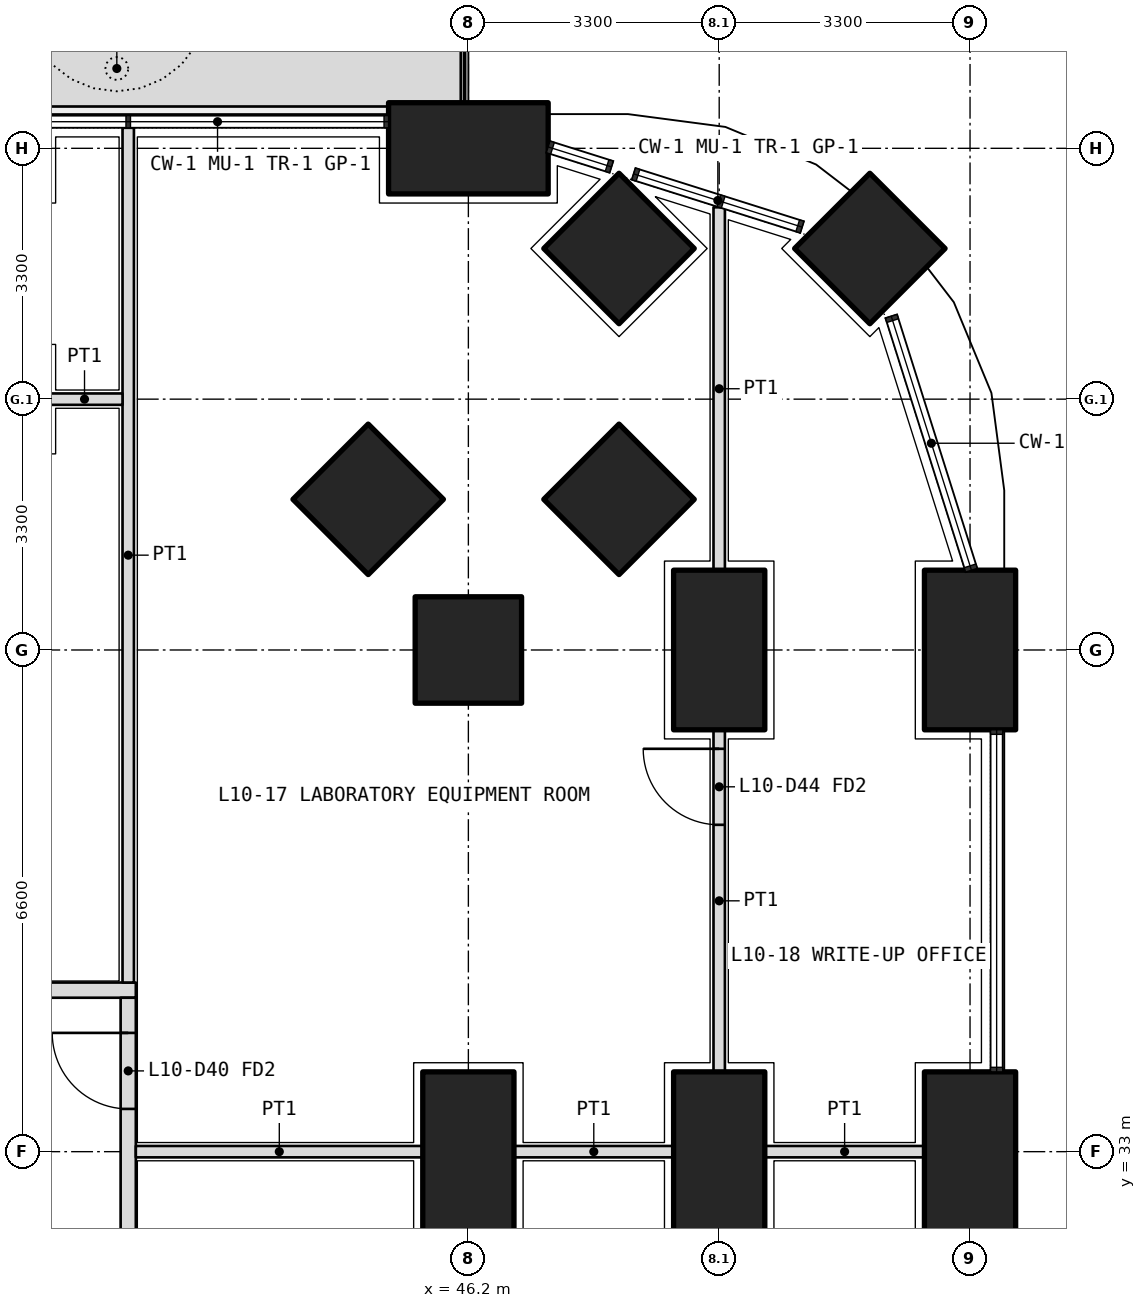
"""IFC4 building model, lengths in metres.
Left out: names, types, materials, properties, quantities, classifications, styles, units other than length and angle.
Written with IfcOpenShell. Run it as: python <this file> out.ifc"""

import sys

from ifc_helpers import new_model, si_unit, direction, frame, frame_2d, origin, origin_2d, place, context, subcontext, project, spatial, polyline, rectangle, outline, extrude, element, fill, save


model = new_model("IFC4")
c1 = context("Model", 3, precision=1e-05, world=origin(), true_north=direction((0.0, 1.0)))
c2 = subcontext(c1, "Body", "Model", "MODEL_VIEW")
j1 = project(units=[si_unit("LENGTHUNIT", "METRE"), si_unit("PLANEANGLEUNIT", "RADIAN")], contexts=[c1])
p1 = place(None, origin())
s1 = spatial("IfcSite", under=j1, at=p1, CompositionType="ELEMENT")
p2 = place(p1, origin())
s2 = spatial("IfcBuilding", under=s1, at=p2, CompositionType="ELEMENT")
p3 = place(p2, frame((0.0, 0.0, 46.5)))
s3 = spatial("IfcBuildingStorey", under=s2, at=p3, CompositionType="ELEMENT", Elevation=46.5)
p4 = place(p3, frame((51.482, 44.882, 0.0), z_axis=(0.0, 0.0, 1.0), x_axis=(0.707106781187, 0.707106781187, 0.0)))
e1 = element("IfcColumn", 1, at=p4, inside=s3, PredefinedType="COLUMN", context=c2, shape_type="SweptSolid", body=[
    extrude(rectangle(XDim=1.4, YDim=1.4, at=origin_2d()), origin(), (0.0, 0.0, 1.0), 4.2),
])
for number, where, z_axis, x_axis in (
    (2, (52.8, 33.0, 0.0), (0.0, 0.0, 1.0), (0.0, 1.0, 0.0)),
    (3, (52.8, 39.6, 0.0), (0.0, 0.0, 1.0), (0.0, 1.0, 0.0)),
    (4, (46.2, 46.2, 0.0), (0.0, 0.0, 1.0), (1.0, 0.0, 0.0)),
):
    element("IfcColumn", number, at=place(p3, frame(where, z_axis=z_axis, x_axis=x_axis)), inside=s3, PredefinedType="COLUMN", context=c2, shape_type="SweptSolid", body=[
        extrude(rectangle(XDim=2.1, YDim=1.2, at=origin_2d()), origin(), (0.0, 0.0, 1.0), 4.2),
    ])
for number, where, z_axis, x_axis in (
    (5, (46.2, 39.6, 0.0), (0.0, 0.0, 1.0), (1.0, 0.0, 0.0)),
    (6, (48.182, 44.882, 0.0), (0.0, 0.0, 1.0), (0.707, 0.707, 0.0)),
):
    element("IfcColumn", number, at=place(p3, frame(where, z_axis=z_axis, x_axis=x_axis)), inside=s3, PredefinedType="COLUMN", context=c2, shape_type="SweptSolid", body=[
        extrude(rectangle(XDim=1.4, YDim=1.4, at=origin_2d()), origin(), (0.0, 0.0, 1.0), 4.2),
    ])
for number, where, z_axis, x_axis in (
    (7, (49.5, 33.0, 0.0), (0.0, 0.0, 1.0), (0.0, 1.0, 0.0)),
    (8, (49.5, 39.6, 0.0), (0.0, 0.0, 1.0), (0.0, 1.0, 0.0)),
):
    element("IfcColumn", number, at=place(p3, frame(where, z_axis=z_axis, x_axis=x_axis)), inside=s3, PredefinedType="COLUMN", context=c2, shape_type="SweptSolid", body=[
        extrude(rectangle(XDim=2.1, YDim=1.2, at=origin_2d()), origin(), (0.0, 0.0, 1.0), 4.2),
    ])
for number, where, z_axis, x_axis in (
    (9, (48.182, 41.582, 0.0), (0.0, 0.0, 1.0), (0.707, 0.707, 0.0)),
    (10, (44.882, 41.582, 0.0), (0.0, 0.0, 1.0), (0.707, 0.707, 0.0)),
):
    element("IfcColumn", number, at=place(p3, frame(where, z_axis=z_axis, x_axis=x_axis)), inside=s3, PredefinedType="COLUMN", context=c2, shape_type="SweptSolid", body=[
        extrude(rectangle(XDim=1.4, YDim=1.4, at=origin_2d()), origin(), (0.0, 0.0, 1.0), 4.2),
    ])
p5 = place(p3, frame((46.2, 33.0, 0.0), z_axis=(0.0, 0.0, 1.0), x_axis=(0.0, 1.0, 0.0)))
e11 = element("IfcColumn", 11, at=p5, inside=s3, PredefinedType="COLUMN", context=c2, shape_type="SweptSolid", body=[
    extrude(rectangle(XDim=2.1, YDim=1.2, at=origin_2d()), origin(), (0.0, 0.0, 1.0), 4.2),
])
p6 = place(p3, origin())
e12 = element("IfcWall", 12, at=p6, inside=s3, PredefinedType="USERDEFINED", context=c2, shape_type="SweptSolid", body=[
    extrude(outline(polyline([(37.05, 46.75), (46.1, 46.75), (46.1, 47.75), (37.05, 47.75), (37.05, 46.75)]), holes=[polyline([(37.2, 46.9), (45.95, 46.9), (45.95, 47.6), (37.2, 47.6), (37.2, 46.9)])]), origin(), (0.0, 0.0, 1.0), 1.05),
])
p7 = place(p3, frame((10.975, 35.125, 0.0), z_axis=(0.0, 0.0, 1.0), x_axis=(1.0, 0.0, 0.0)))
e13 = element("IfcWall", 13, at=p7, inside=s3, PredefinedType="PARTITIONING", context=c2, shape_type="SweptSolid", body=[
    extrude(rectangle(XDim=30.85, YDim=0.2, at=frame_2d((15.425, 0.0))), origin(), (0.0, 0.0, 1.0), 2.85),
])
p8 = place(p7, frame((3.962, 0.0, 0.0)))
e14 = element("IfcOpeningElement", 14, at=p8, cuts=e13, PredefinedType="OPENING", context=c2, shape_type="SweptSolid", body=[
    extrude(rectangle(XDim=1.0, YDim=2.1, at=frame_2d((0.5, 1.05))), frame((0.0, 0.11, 0.0), z_axis=(0.0, -1.0, 0.0), x_axis=(1.0, 0.0, 0.0)), (0.0, 0.0, 1.0), 0.22),
])
p9 = place(p7, frame((16.475, 0.0, 0.0)))
e15 = element("IfcOpeningElement", 15, at=p9, cuts=e13, PredefinedType="OPENING", context=c2, shape_type="SweptSolid", body=[
    extrude(rectangle(XDim=1.2, YDim=2.1, at=frame_2d((0.6, 1.05))), frame((0.0, 0.11, 0.0), z_axis=(0.0, -1.0, 0.0), x_axis=(1.0, 0.0, 0.0)), (0.0, 0.0, 1.0), 0.22),
])
p10 = place(p7, frame((27.438, 0.0, 0.0)))
e16 = element("IfcOpeningElement", 16, at=p10, cuts=e13, PredefinedType="OPENING", context=c2, shape_type="SweptSolid", body=[
    extrude(rectangle(XDim=1.2, YDim=2.1, at=frame_2d((0.6, 1.05))), frame((0.0, 0.11, 0.0), z_axis=(0.0, -1.0, 0.0), x_axis=(1.0, 0.0, 0.0)), (0.0, 0.0, 1.0), 0.22),
])
p11 = place(p3, frame((41.725, 11.175, 0.0), z_axis=(0.0, 0.0, 1.0), x_axis=(0.0, 1.0, 0.0)))
e17 = element("IfcWall", 17, at=p11, inside=s3, PredefinedType="PARTITIONING", context=c2, shape_type="SweptSolid", body=[
    extrude(rectangle(XDim=23.85, YDim=0.2, at=frame_2d((11.925, 0.0))), origin(), (0.0, 0.0, 1.0), 2.85),
])
p12 = place(p11, frame((3.762, 0.0, 0.0)))
e18 = element("IfcOpeningElement", 18, at=p12, cuts=e17, PredefinedType="OPENING", context=c2, shape_type="SweptSolid", body=[
    extrude(rectangle(XDim=1.0, YDim=2.1, at=frame_2d((0.5, 1.05))), frame((0.0, 0.11, 0.0), z_axis=(0.0, -1.0, 0.0), x_axis=(1.0, 0.0, 0.0)), (0.0, 0.0, 1.0), 0.22),
])
p13 = place(p11, frame((9.625, 0.0, 0.0)))
e19 = element("IfcOpeningElement", 19, at=p13, cuts=e17, PredefinedType="OPENING", context=c2, shape_type="SweptSolid", body=[
    extrude(rectangle(XDim=1.0, YDim=2.1, at=frame_2d((0.5, 1.05))), frame((0.0, 0.11, 0.0), z_axis=(0.0, -1.0, 0.0), x_axis=(1.0, 0.0, 0.0)), (0.0, 0.0, 1.0), 0.22),
])
p14 = place(p11, frame((12.975, 0.0, 0.0)))
e20 = element("IfcOpeningElement", 20, at=p14, cuts=e17, PredefinedType="OPENING", context=c2, shape_type="SweptSolid", body=[
    extrude(rectangle(XDim=0.9, YDim=2.1, at=frame_2d((0.45, 1.05))), frame((0.0, 0.11, 0.0), z_axis=(0.0, -1.0, 0.0), x_axis=(1.0, 0.0, 0.0)), (0.0, 0.0, 1.0), 0.22),
])
p15 = place(p11, frame((17.925, 0.0, 0.0)))
e21 = element("IfcOpeningElement", 21, at=p15, cuts=e17, PredefinedType="OPENING", context=c2, shape_type="SweptSolid", body=[
    extrude(rectangle(XDim=1.2, YDim=2.1, at=frame_2d((0.6, 1.05))), frame((0.0, 0.11, 0.0), z_axis=(0.0, -1.0, 0.0), x_axis=(1.0, 0.0, 0.0)), (0.0, 0.0, 1.0), 0.22),
])
p16 = place(p11, frame((22.387, 0.0, 0.0)))
e22 = element("IfcOpeningElement", 22, at=p16, cuts=e17, PredefinedType="OPENING", context=c2, shape_type="SweptSolid", body=[
    extrude(rectangle(XDim=1.0, YDim=2.1, at=frame_2d((0.5, 1.05))), frame((0.0, 0.11, 0.0), z_axis=(0.0, -1.0, 0.0), x_axis=(1.0, 0.0, 0.0)), (0.0, 0.0, 1.0), 0.22),
])
p17 = place(p3, frame((41.725, 46.47, 0.0), z_axis=(0.0, 0.0, 1.0), x_axis=(0.0, -1.0, 0.0)))
e23 = element("IfcWall", 23, at=p17, inside=s3, PredefinedType="PARTITIONING", context=c2, shape_type="SweptSolid", body=[
    extrude(rectangle(XDim=11.245, YDim=0.15, at=frame_2d((5.623, 0.0))), origin(), (0.0, 0.0, 1.0), 2.7),
])
p18 = place(p3, frame((49.5, 34.05, 0.0), z_axis=(0.0, 0.0, 1.0), x_axis=(0.0, 1.0, 0.0)))
e24 = element("IfcWall", 24, at=p18, inside=s3, PredefinedType="PARTITIONING", context=c2, shape_type="SweptSolid", body=[
    extrude(rectangle(XDim=4.5, YDim=0.15, at=frame_2d((2.25, 0.0))), origin(), (0.0, 0.0, 1.0), 3.9),
])
p19 = place(p18, frame((3.25, 0.0, 0.0)))
e25 = element("IfcOpeningElement", 25, at=p19, cuts=e24, PredefinedType="OPENING", context=c2, shape_type="SweptSolid", body=[
    extrude(rectangle(XDim=1.0, YDim=2.1, at=frame_2d((0.5, 1.05))), frame((0.0, 0.085, 0.0), z_axis=(0.0, -1.0, 0.0), x_axis=(1.0, 0.0, 0.0)), (0.0, 0.0, 1.0), 0.17),
])
p20 = place(p3, frame((49.5, 40.65, 0.0), z_axis=(0.0, 0.0, 1.0), x_axis=(0.0, 1.0, 0.0)))
e26 = element("IfcWall", 26, at=p20, inside=s3, PredefinedType="PARTITIONING", context=c2, shape_type="SweptSolid", body=[
    extrude(rectangle(XDim=4.774, YDim=0.15, at=frame_2d((2.387, 0.0))), origin(), (0.0, 0.0, 1.0), 2.7),
])
for number, where, z_axis, x_axis in (
    (27, (52.2, 33.0, 0.0), (0.0, 0.0, 1.0), (-1.0, 0.0, 0.0)),
    (28, (48.9, 33.0, 0.0), (0.0, 0.0, 1.0), (-1.0, 0.0, 0.0)),
):
    element("IfcWall", number, at=place(p3, frame(where, z_axis=z_axis, x_axis=x_axis)), inside=s3, PredefinedType="PARTITIONING", context=c2, shape_type="SweptSolid", body=[
        extrude(rectangle(XDim=2.1, YDim=0.15, at=frame_2d((1.05, 0.0))), origin(), (0.0, 0.0, 1.0), 2.85),
    ])
p21 = place(p3, frame((45.6, 33.0, 0.0), z_axis=(0.0, 0.0, 1.0), x_axis=(-1.0, 0.0, 0.0)))
e29 = element("IfcWall", 29, at=p21, inside=s3, PredefinedType="PARTITIONING", context=c2, shape_type="SweptSolid", body=[
    extrude(rectangle(XDim=3.775, YDim=0.15, at=frame_2d((1.888, 0.0))), origin(), (0.0, 0.0, 1.0), 2.85),
])
p22 = place(p3, frame((41.65, 42.9, 0.0), z_axis=(0.0, 0.0, 1.0), x_axis=(-1.0, 0.0, 0.0)))
e30 = element("IfcWall", 30, at=p22, inside=s3, PredefinedType="PARTITIONING", context=c2, shape_type="SweptSolid", body=[
    extrude(rectangle(XDim=1.0, YDim=0.15, at=frame_2d((0.5, 0.0))), origin(), (0.0, 0.0, 1.0), 3.9),
])
p23 = place(p16, origin())
e31 = element("IfcDoor", 31, at=p23, inside=s3, OperationType="SINGLE_SWING_RIGHT", PredefinedType="DOOR", context=c2, shape_type="SweptSolid", body=[
    extrude(rectangle(XDim=1.0, YDim=2.1, at=frame_2d((0.5, 1.05))), frame((0.0, 0.025, 0.0), z_axis=(0.0, -1.0, 0.0), x_axis=(1.0, 0.0, 0.0)), (0.0, 0.0, 1.0), 0.05),
])
fill(e22, e31)
p24 = place(p19, origin())
e32 = element("IfcDoor", 32, at=p24, inside=s3, OperationType="SINGLE_SWING_RIGHT", PredefinedType="DOOR", context=c2, shape_type="SweptSolid", body=[
    extrude(rectangle(XDim=1.0, YDim=2.1, at=frame_2d((0.5, 1.05))), frame((0.0, 0.025, 0.0), z_axis=(0.0, -1.0, 0.0), x_axis=(1.0, 0.0, 0.0)), (0.0, 0.0, 1.0), 0.05),
])
fill(e25, e32)
save(model, sys.argv[1])
